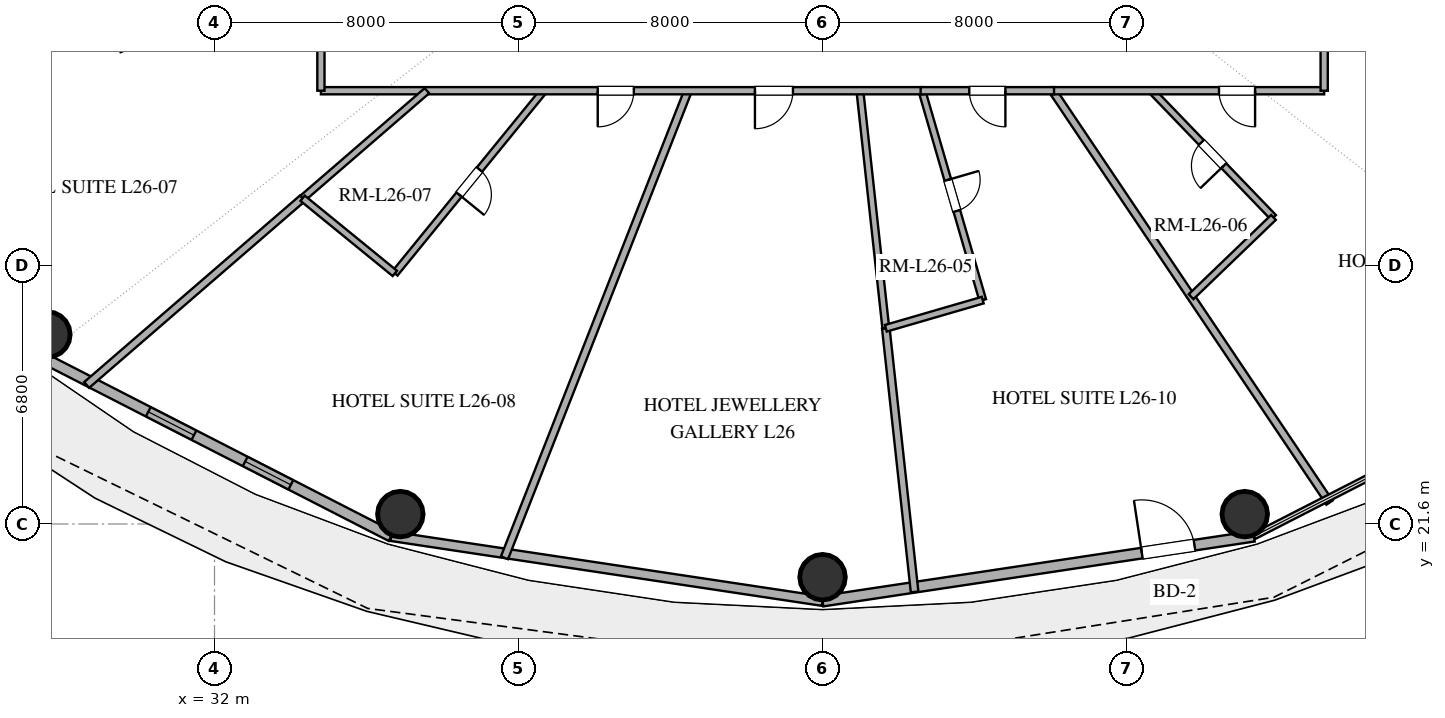
"""IFC4 building model, lengths in metres.
Left out: names, types, materials, properties, quantities, classifications, styles, units other than length and angle.
Written with IfcOpenShell. Run it as: python <this file> out.ifc"""

import sys

from ifc_helpers import new_model, si_unit, direction, frame, frame_2d, origin, origin_2d, place, context, subcontext, project, spatial, rectangle, hollow_circle, extrude, element, fill, save


model = new_model("IFC4")
c1 = context("Model", 3, precision=1e-05, world=origin(), true_north=direction((0.0, 1.0)))
c2 = subcontext(c1, "Body", "Model", "MODEL_VIEW")
j1 = project(units=[si_unit("LENGTHUNIT", "METRE"), si_unit("PLANEANGLEUNIT", "RADIAN")], contexts=[c1])
p1 = place(None, origin())
s1 = spatial("IfcSite", under=j1, at=p1, CompositionType="ELEMENT")
p2 = place(p1, origin())
s2 = spatial("IfcBuilding", under=s1, at=p2, CompositionType="ELEMENT")
p3 = place(p2, frame((0.0, 0.0, 105.6)))
s3 = spatial("IfcBuildingStorey", under=s2, at=p3, CompositionType="ELEMENT", Elevation=105.6)
for number, where, z_axis, x_axis in (
    (1, (27.602, 26.585, 0.0), (0.0, 0.0, 1.0), (1.0, 0.0, 0.0)),
    (2, (36.89, 21.859, 0.0), (0.0, 0.0, 1.0), (1.0, 0.0, 0.0)),
    (3, (48.0, 20.2, 0.0), (0.0, 0.0, 1.0), (1.0, 0.0, 0.0)),
    (4, (59.11, 21.859, 0.0), (0.0, 0.0, 1.0), (1.0, 0.0, 0.0)),
):
    element("IfcColumn", number, at=place(p3, frame(where, z_axis=z_axis, x_axis=x_axis)), inside=s3, PredefinedType="COLUMN", context=c2, shape_type="SweptSolid", body=[
        extrude(hollow_circle(Radius=0.6, WallThickness=0.032, at=origin_2d()), origin(), (0.0, 0.0, 1.0), 3.38),
    ])
p4 = place(p3, frame((27.16, 26.14, 0.0), z_axis=(0.0, 0.0, 1.0), x_axis=(0.889959505023, -0.45603955905, 0.0)))
e5 = element("IfcWall", 5, at=p4, inside=s3, PredefinedType="SOLIDWALL", context=c2, shape_type="SweptSolid", body=[
    extrude(rectangle(XDim=10.662, YDim=0.28, at=frame_2d((5.331, 0.0))), origin(), (0.0, 0.0, 1.0), 3.38),
])
p5 = place(p4, frame((3.481, 0.0, 0.85)))
e6 = element("IfcOpeningElement", 6, at=p5, cuts=e5, PredefinedType="OPENING", context=c2, shape_type="SweptSolid", body=[
    extrude(rectangle(XDim=1.35, YDim=1.8, at=frame_2d((0.675, 0.9))), frame((0.0, 0.15, 0.0), z_axis=(0.0, -1.0, 0.0), x_axis=(1.0, 0.0, 0.0)), (0.0, 0.0, 1.0), 0.3),
])
p6 = place(p4, frame((6.346, 0.0, 0.85)))
e7 = element("IfcOpeningElement", 7, at=p6, cuts=e5, PredefinedType="OPENING", context=c2, shape_type="SweptSolid", body=[
    extrude(rectangle(XDim=1.35, YDim=1.8, at=frame_2d((0.675, 0.9))), frame((0.0, 0.15, 0.0), z_axis=(0.0, -1.0, 0.0), x_axis=(1.0, 0.0, 0.0)), (0.0, 0.0, 1.0), 0.3),
])
p7 = place(p3, frame((36.649, 21.277, 0.0), z_axis=(0.0, 0.0, 1.0), x_axis=(0.988877774656, -0.148730450117, 0.0)))
e8 = element("IfcWall", 8, at=p7, inside=s3, PredefinedType="SOLIDWALL", context=c2, shape_type="SweptSolid", body=[
    extrude(rectangle(XDim=11.479, YDim=0.25, at=frame_2d((5.74, 0.0))), origin(), (0.0, 0.0, 1.0), 3.38),
])
p8 = place(p3, frame((48.0, 19.57, 0.0), z_axis=(0.0, 0.0, 1.0), x_axis=(0.988877774656, 0.148730450117, 0.0)))
e9 = element("IfcWall", 9, at=p8, inside=s3, PredefinedType="SOLIDWALL", context=c2, shape_type="SweptSolid", body=[
    extrude(rectangle(XDim=11.479, YDim=0.28, at=frame_2d((5.74, 0.0))), origin(), (0.0, 0.0, 1.0), 3.38),
])
p9 = place(p8, frame((8.497, 0.0, 0.0)))
e10 = element("IfcOpeningElement", 10, at=p9, cuts=e9, PredefinedType="OPENING", context=c2, shape_type="SweptSolid", body=[
    extrude(rectangle(XDim=1.4, YDim=2.2, at=frame_2d((0.7, 1.1))), frame((0.0, 0.15, 0.0), z_axis=(0.0, -1.0, 0.0), x_axis=(1.0, 0.0, 0.0)), (0.0, 0.0, 1.0), 0.3),
])
p10 = place(p3, frame((39.63, 20.711, 0.0), z_axis=(0.0, 0.0, 1.0), x_axis=(0.365888605627, 0.930658652929, 0.0)))
e11 = element("IfcWall", 11, at=p10, inside=s3, PredefinedType="PARTITIONING", context=c2, shape_type="SweptSolid", body=[
    extrude(rectangle(XDim=13.205, YDim=0.2, at=frame_2d((6.603, 0.0))), origin(), (0.0, 0.0, 1.0), 2.74),
])
p11 = place(p3, frame((28.636, 25.258, 0.0), z_axis=(0.0, 0.0, 1.0), x_axis=(0.756485284597, 0.654010714124, 0.0)))
e12 = element("IfcWall", 12, at=p11, inside=s3, PredefinedType="PARTITIONING", context=c2, shape_type="SweptSolid", body=[
    extrude(rectangle(XDim=7.512, YDim=0.2, at=frame_2d((3.756, 0.0))), origin(), (0.0, 0.0, 1.0), 2.74),
])
p12 = place(p3, frame((50.422, 19.813, 0.0), z_axis=(0.0, 0.0, 1.0), x_axis=(-0.108534266563, 0.994092708444, 0.0)))
e13 = element("IfcWall", 13, at=p12, inside=s3, PredefinedType="PARTITIONING", context=c2, shape_type="SweptSolid", body=[
    extrude(rectangle(XDim=6.978, YDim=0.2, at=frame_2d((3.489, 0.0))), origin(), (0.0, 0.0, 1.0), 2.74),
])
p13 = place(p3, frame((54.053, 33.0, 0.0), z_axis=(0.0, 0.0, 1.0), x_axis=(0.558073496329, -0.829791523634, 0.0)))
e14 = element("IfcWall", 14, at=p13, inside=s3, PredefinedType="PARTITIONING", context=c2, shape_type="SweptSolid", body=[
    extrude(rectangle(XDim=13.06, YDim=0.2, at=frame_2d((6.53, 0.0))), origin(), (0.0, 0.0, 1.0), 2.74),
])
p14 = place(p3, frame((49.665, 26.75, 0.0), z_axis=(0.0, 0.0, 1.0), x_axis=(-0.108526347032, 0.99409357306, 0.0)))
e15 = element("IfcWall", 15, at=p14, inside=s3, PredefinedType="PLUMBINGWALL", context=c2, shape_type="SweptSolid", body=[
    extrude(rectangle(XDim=6.288, YDim=0.18, at=frame_2d((3.144, 0.0))), origin(), (0.0, 0.0, 1.0), 2.74),
])
p15 = place(p3, frame((40.664, 33.0, 0.0), z_axis=(0.0, 0.0, 1.0), x_axis=(-0.631841179317, -0.775097880347, 0.0)))
e16 = element("IfcWall", 16, at=p15, inside=s3, PredefinedType="PLUMBINGWALL", context=c2, shape_type="SweptSolid", body=[
    extrude(rectangle(XDim=6.202, YDim=0.18, at=frame_2d((3.101, 0.0))), origin(), (0.0, 0.0, 1.0), 2.74),
])
p16 = place(p15, frame((2.676, 0.0, 0.0)))
e17 = element("IfcOpeningElement", 17, at=p16, cuts=e16, PredefinedType="OPENING", context=c2, shape_type="SweptSolid", body=[
    extrude(rectangle(XDim=0.85, YDim=2.1, at=frame_2d((0.425, 1.05))), frame((0.0, 0.1, 0.0), z_axis=(0.0, -1.0, 0.0), x_axis=(1.0, 0.0, 0.0)), (0.0, 0.0, 1.0), 0.2),
])
p17 = place(p3, frame((50.615, 33.0, 0.0), z_axis=(0.0, 0.0, 1.0), x_axis=(0.278967165891, -0.960300640609, 0.0)))
e18 = element("IfcWall", 18, at=p17, inside=s3, PredefinedType="PLUMBINGWALL", context=c2, shape_type="SweptSolid", body=[
    extrude(rectangle(XDim=5.738, YDim=0.18, at=frame_2d((2.869, 0.0))), origin(), (0.0, 0.0, 1.0), 2.74),
])
p18 = place(p17, frame((2.444, 0.0, 0.0)))
e19 = element("IfcOpeningElement", 19, at=p18, cuts=e18, PredefinedType="OPENING", context=c2, shape_type="SweptSolid", body=[
    extrude(rectangle(XDim=0.85, YDim=2.1, at=frame_2d((0.425, 1.05))), frame((0.0, 0.1, 0.0), z_axis=(0.0, -1.0, 0.0), x_axis=(1.0, 0.0, 0.0)), (0.0, 0.0, 1.0), 0.2),
])
p19 = place(p3, frame((66.243, 32.143, 0.0), z_axis=(0.0, 0.0, 1.0), x_axis=(-0.879784992633, 0.475371819461, 0.0)))
e20 = element("IfcWall", 20, at=p19, inside=s3, PredefinedType="PLUMBINGWALL", context=c2, shape_type="SweptSolid", body=[
    extrude(rectangle(XDim=5.732, YDim=0.18, at=frame_2d((2.866, 0.0))), origin(), (0.0, 0.0, 1.0), 2.74),
])
p20 = place(p3, frame((59.866, 29.666, 0.0), z_axis=(0.0, 0.0, 1.0), x_axis=(-0.693306956927, 0.720642396392, 0.0)))
e21 = element("IfcWall", 21, at=p20, inside=s3, PredefinedType="PLUMBINGWALL", context=c2, shape_type="SweptSolid", body=[
    extrude(rectangle(XDim=4.626, YDim=0.18, at=frame_2d((2.313, 0.0))), origin(), (0.0, 0.0, 1.0), 2.74),
])
p21 = place(p20, frame((1.888, 0.0, 0.0)))
e22 = element("IfcOpeningElement", 22, at=p21, cuts=e21, PredefinedType="OPENING", context=c2, shape_type="SweptSolid", body=[
    extrude(rectangle(XDim=0.85, YDim=2.1, at=frame_2d((0.425, 1.05))), frame((0.0, 0.1, 0.0), z_axis=(0.0, -1.0, 0.0), x_axis=(1.0, 0.0, 0.0)), (0.0, 0.0, 1.0), 0.2),
])
p22 = place(p3, frame((50.648, 33.0, 0.0), z_axis=(0.0, 0.0, 1.0), x_axis=(-1.0, 0.0, 0.0)))
e23 = element("IfcWall", 23, at=p22, inside=s3, PredefinedType="PARTITIONING", context=c2, shape_type="SweptSolid", body=[
    extrude(rectangle(XDim=15.848, YDim=0.19, at=frame_2d((7.924, 0.0))), origin(), (0.0, 0.0, 1.0), 2.74),
])
p23 = place(p22, frame((3.427, 0.0, 0.0)))
e24 = element("IfcOpeningElement", 24, at=p23, cuts=e23, PredefinedType="OPENING", context=c2, shape_type="SweptSolid", body=[
    extrude(rectangle(XDim=1.0, YDim=2.2, at=frame_2d((0.5, 1.1))), frame((0.0, 0.105, 0.0), z_axis=(0.0, -1.0, 0.0), x_axis=(1.0, 0.0, 0.0)), (0.0, 0.0, 1.0), 0.21),
])
p24 = place(p22, frame((7.614, 0.0, 0.0)))
e25 = element("IfcOpeningElement", 25, at=p24, cuts=e23, PredefinedType="OPENING", context=c2, shape_type="SweptSolid", body=[
    extrude(rectangle(XDim=0.95, YDim=2.15, at=frame_2d((0.475, 1.075))), frame((0.0, 0.105, 0.0), z_axis=(0.0, -1.0, 0.0), x_axis=(1.0, 0.0, 0.0)), (0.0, 0.0, 1.0), 0.21),
])
p25 = place(p3, frame((61.2, 33.0, 0.0), z_axis=(0.0, 0.0, 1.0), x_axis=(-1.0, 0.0, 0.0)))
e26 = element("IfcWall", 26, at=p25, inside=s3, PredefinedType="PARTITIONING", context=c2, shape_type="SweptSolid", body=[
    extrude(rectangle(XDim=7.186, YDim=0.19, at=frame_2d((3.593, 0.0))), origin(), (0.0, 0.0, 1.0), 2.74),
])
p26 = place(p25, frame((1.818, 0.0, 0.0)))
e27 = element("IfcOpeningElement", 27, at=p26, cuts=e26, PredefinedType="OPENING", context=c2, shape_type="SweptSolid", body=[
    extrude(rectangle(XDim=0.95, YDim=2.15, at=frame_2d((0.475, 1.075))), frame((0.0, 0.105, 0.0), z_axis=(0.0, -1.0, 0.0), x_axis=(1.0, 0.0, 0.0)), (0.0, 0.0, 1.0), 0.21),
])
p27 = place(p3, frame((34.319, 30.171, 0.0), z_axis=(0.0, 0.0, 1.0), x_axis=(0.756448461864, 0.654053304053, 0.0)))
e28 = element("IfcWall", 28, at=p27, inside=s3, PredefinedType="PLUMBINGWALL", context=c2, shape_type="SweptSolid", body=[
    extrude(rectangle(XDim=4.325, YDim=0.18, at=frame_2d((2.163, 0.0))), origin(), (0.0, 0.0, 1.0), 2.74),
])
p28 = place(p3, frame((61.2, 41.873, 0.0), z_axis=(0.0, 0.0, 1.0), x_axis=(0.0, -1.0, 0.0)))
e29 = element("IfcWall", 29, at=p28, inside=s3, PredefinedType="PARTITIONING", context=c2, shape_type="SweptSolid", body=[
    extrude(rectangle(XDim=8.873, YDim=0.19, at=frame_2d((4.436, 0.0))), origin(), (0.0, 0.0, 1.0), 2.74),
])
p29 = place(p28, frame((1.676, 0.0, 0.0)))
e30 = element("IfcOpeningElement", 30, at=p29, cuts=e29, PredefinedType="OPENING", context=c2, shape_type="SweptSolid", body=[
    extrude(rectangle(XDim=0.95, YDim=2.15, at=frame_2d((0.475, 1.075))), frame((0.0, 0.105, 0.0), z_axis=(0.0, -1.0, 0.0), x_axis=(1.0, 0.0, 0.0)), (0.0, 0.0, 1.0), 0.21),
])
p30 = place(p3, frame((54.092, 33.0, 0.0), z_axis=(0.0, 0.0, 1.0), x_axis=(-1.0, 0.0, 0.0)))
e31 = element("IfcWall", 31, at=p30, inside=s3, PredefinedType="PARTITIONING", context=c2, shape_type="SweptSolid", body=[
    extrude(rectangle(XDim=3.51, YDim=0.19, at=frame_2d((1.755, 0.0))), origin(), (0.0, 0.0, 1.0), 2.74),
])
p31 = place(p30, frame((1.28, 0.0, 0.0)))
e32 = element("IfcOpeningElement", 32, at=p31, cuts=e31, PredefinedType="OPENING", context=c2, shape_type="SweptSolid", body=[
    extrude(rectangle(XDim=0.95, YDim=2.15, at=frame_2d((0.475, 1.075))), frame((0.0, 0.105, 0.0), z_axis=(0.0, -1.0, 0.0), x_axis=(1.0, 0.0, 0.0)), (0.0, 0.0, 1.0), 0.21),
])
p32 = place(p3, frame((34.8, 33.0, 0.0), z_axis=(0.0, 0.0, 1.0), x_axis=(0.0, 1.0, 0.0)))
e33 = element("IfcWall", 33, at=p32, inside=s3, PredefinedType="PARTITIONING", context=c2, shape_type="SweptSolid", body=[
    extrude(rectangle(XDim=3.398, YDim=0.19, at=frame_2d((1.699, 0.0))), origin(), (0.0, 0.0, 1.0), 2.74),
])
p33 = place(p32, frame((1.224, 0.0, 0.0)))
e34 = element("IfcOpeningElement", 34, at=p33, cuts=e33, PredefinedType="OPENING", context=c2, shape_type="SweptSolid", body=[
    extrude(rectangle(XDim=0.95, YDim=2.15, at=frame_2d((0.475, 1.075))), frame((0.0, 0.105, 0.0), z_axis=(0.0, -1.0, 0.0), x_axis=(1.0, 0.0, 0.0)), (0.0, 0.0, 1.0), 0.21),
])
p34 = place(p3, frame((36.745, 28.193, 0.0), z_axis=(0.0, 0.0, 1.0), x_axis=(-0.775130314585, 0.631801389212, 0.0)))
e35 = element("IfcWall", 35, at=p34, inside=s3, PredefinedType="PLUMBINGWALL", context=c2, shape_type="SweptSolid", body=[
    extrude(rectangle(XDim=3.131, YDim=0.18, at=frame_2d((1.565, 0.0))), origin(), (0.0, 0.0, 1.0), 2.74),
])
p35 = place(p3, frame((57.698, 27.58, 0.0), z_axis=(0.0, 0.0, 1.0), x_axis=(0.720688028056, 0.693259522991, 0.0)))
e36 = element("IfcWall", 36, at=p35, inside=s3, PredefinedType="PLUMBINGWALL", context=c2, shape_type="SweptSolid", body=[
    extrude(rectangle(XDim=3.009, YDim=0.18, at=frame_2d((1.504, 0.0))), origin(), (0.0, 0.0, 1.0), 2.74),
])
p36 = place(p3, frame((52.215, 27.49, 0.0), z_axis=(0.0, 0.0, 1.0), x_axis=(-0.960314459225, -0.278919593078, 0.0)))
e37 = element("IfcWall", 37, at=p36, inside=s3, PredefinedType="PLUMBINGWALL", context=c2, shape_type="SweptSolid", body=[
    extrude(rectangle(XDim=2.656, YDim=0.18, at=frame_2d((1.328, 0.0))), origin(), (0.0, 0.0, 1.0), 2.74),
])
p37 = place(p5, origin())
e38 = element("IfcWindow", 38, at=p37, inside=s3, PartitioningType="SINGLE_PANEL", PredefinedType="WINDOW", context=c2, shape_type="SweptSolid", body=[
    extrude(rectangle(XDim=1.35, YDim=1.8, at=frame_2d((0.675, 0.9))), frame((0.0, 0.03, 0.0), z_axis=(0.0, -1.0, 0.0), x_axis=(1.0, 0.0, 0.0)), (0.0, 0.0, 1.0), 0.06),
])
fill(e6, e38)
p38 = place(p6, origin())
e39 = element("IfcWindow", 39, at=p38, inside=s3, PartitioningType="SINGLE_PANEL", PredefinedType="WINDOW", context=c2, shape_type="SweptSolid", body=[
    extrude(rectangle(XDim=1.35, YDim=1.8, at=frame_2d((0.675, 0.9))), frame((0.0, 0.03, 0.0), z_axis=(0.0, -1.0, 0.0), x_axis=(1.0, 0.0, 0.0)), (0.0, 0.0, 1.0), 0.06),
])
fill(e7, e39)
p39 = place(p9, origin())
e40 = element("IfcDoor", 40, at=p39, inside=s3, OperationType="SINGLE_SWING_LEFT", PredefinedType="DOOR", context=c2, shape_type="SweptSolid", body=[
    extrude(rectangle(XDim=1.4, YDim=2.2, at=frame_2d((0.7, 1.1))), frame((0.0, 0.025, 0.0), z_axis=(0.0, -1.0, 0.0), x_axis=(1.0, 0.0, 0.0)), (0.0, 0.0, 1.0), 0.05),
])
fill(e10, e40)
p40 = place(p16, origin())
e41 = element("IfcDoor", 41, at=p40, inside=s3, OperationType="SINGLE_SWING_RIGHT", PredefinedType="DOOR", context=c2, shape_type="SweptSolid", body=[
    extrude(rectangle(XDim=0.85, YDim=2.1, at=frame_2d((0.425, 1.05))), frame((0.0, 0.025, 0.0), z_axis=(0.0, -1.0, 0.0), x_axis=(1.0, 0.0, 0.0)), (0.0, 0.0, 1.0), 0.05),
])
fill(e17, e41)
p41 = place(p18, origin())
e42 = element("IfcDoor", 42, at=p41, inside=s3, OperationType="SINGLE_SWING_LEFT", PredefinedType="DOOR", context=c2, shape_type="SweptSolid", body=[
    extrude(rectangle(XDim=0.85, YDim=2.1, at=frame_2d((0.425, 1.05))), frame((0.0, 0.025, 0.0), z_axis=(0.0, -1.0, 0.0), x_axis=(1.0, 0.0, 0.0)), (0.0, 0.0, 1.0), 0.05),
])
fill(e19, e42)
p42 = place(p21, origin())
e43 = element("IfcDoor", 43, at=p42, inside=s3, OperationType="SINGLE_SWING_LEFT", PredefinedType="DOOR", context=c2, shape_type="SweptSolid", body=[
    extrude(rectangle(XDim=0.85, YDim=2.1, at=frame_2d((0.425, 1.05))), frame((0.0, 0.025, 0.0), z_axis=(0.0, -1.0, 0.0), x_axis=(1.0, 0.0, 0.0)), (0.0, 0.0, 1.0), 0.05),
])
fill(e22, e43)
p43 = place(p23, origin())
e44 = element("IfcDoor", 44, at=p43, inside=s3, OperationType="SINGLE_SWING_RIGHT", PredefinedType="DOOR", context=c2, shape_type="SweptSolid", body=[
    extrude(rectangle(XDim=1.0, YDim=2.2, at=frame_2d((0.5, 1.1))), frame((0.0, 0.025, 0.0), z_axis=(0.0, -1.0, 0.0), x_axis=(1.0, 0.0, 0.0)), (0.0, 0.0, 1.0), 0.05),
])
fill(e24, e44)
p44 = place(p24, origin())
e45 = element("IfcDoor", 45, at=p44, inside=s3, OperationType="SINGLE_SWING_RIGHT", PredefinedType="DOOR", context=c2, shape_type="SweptSolid", body=[
    extrude(rectangle(XDim=0.95, YDim=2.15, at=frame_2d((0.475, 1.075))), frame((0.0, 0.025, 0.0), z_axis=(0.0, -1.0, 0.0), x_axis=(1.0, 0.0, 0.0)), (0.0, 0.0, 1.0), 0.05),
])
fill(e25, e45)
p45 = place(p26, origin())
e46 = element("IfcDoor", 46, at=p45, inside=s3, OperationType="SINGLE_SWING_LEFT", PredefinedType="DOOR", context=c2, shape_type="SweptSolid", body=[
    extrude(rectangle(XDim=0.95, YDim=2.15, at=frame_2d((0.475, 1.075))), frame((0.0, 0.025, 0.0), z_axis=(0.0, -1.0, 0.0), x_axis=(1.0, 0.0, 0.0)), (0.0, 0.0, 1.0), 0.05),
])
fill(e27, e46)
p46 = place(p31, origin())
e47 = element("IfcDoor", 47, at=p46, inside=s3, OperationType="SINGLE_SWING_LEFT", PredefinedType="DOOR", context=c2, shape_type="SweptSolid", body=[
    extrude(rectangle(XDim=0.95, YDim=2.15, at=frame_2d((0.475, 1.075))), frame((0.0, 0.025, 0.0), z_axis=(0.0, -1.0, 0.0), x_axis=(1.0, 0.0, 0.0)), (0.0, 0.0, 1.0), 0.05),
])
fill(e32, e47)
save(model, sys.argv[1])
